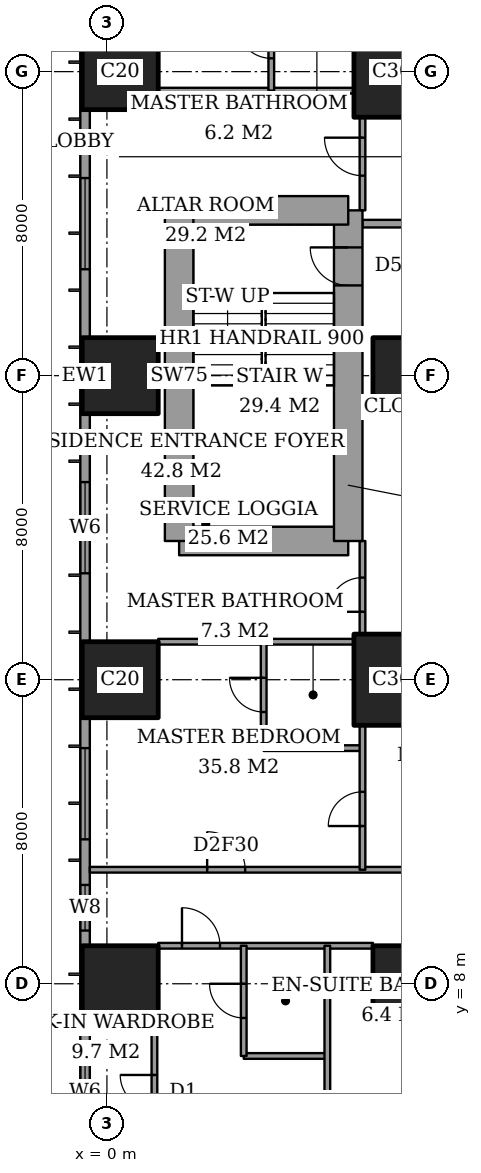
"""IFC4 building model, lengths in metres.
Left out: names, types, materials, properties, quantities, classifications, styles, units other than length and angle.
Written with IfcOpenShell. Run it as: python <this file> out.ifc"""

import sys

from ifc_helpers import new_model, si_unit, direction, frame, frame_2d, origin, origin_2d, place, context, subcontext, project, spatial, rectangle, extrude, element, fill, save


model = new_model("IFC4")
c1 = context("Model", 3, precision=1e-05, world=origin(), true_north=direction((0.0, 1.0)))
c2 = subcontext(c1, "Body", "Model", "MODEL_VIEW")
j1 = project(units=[si_unit("LENGTHUNIT", "METRE"), si_unit("PLANEANGLEUNIT", "RADIAN")], contexts=[c1])
p1 = place(None, origin())
s1 = spatial("IfcSite", under=j1, at=p1, CompositionType="ELEMENT")
p2 = place(p1, origin())
s2 = spatial("IfcBuilding", under=s1, at=p2, CompositionType="ELEMENT")
p3 = place(p2, frame((0.0, 0.0, 69.2)))
s3 = spatial("IfcBuildingStorey", under=s2, at=p3, CompositionType="ELEMENT", Elevation=69.2)
for number, where, z_axis, x_axis in (
    (1, (0.35, 8.0, 0.0), (0.0, 0.0, 1.0), (1.0, 0.0, 0.0)),
    (2, (0.35, 16.0, 0.0), (0.0, 0.0, 1.0), (1.0, 0.0, 0.0)),
    (3, (0.35, 24.0, 0.0), (0.0, 0.0, 1.0), (1.0, 0.0, 0.0)),
    (4, (0.35, 32.0, 0.0), (0.0, 0.0, 1.0), (1.0, 0.0, 0.0)),
    (5, (8.0, 8.0, 0.0), (0.0, 0.0, 1.0), (1.0, 0.0, 0.0)),
):
    element("IfcColumn", number, at=place(p3, frame(where, z_axis=z_axis, x_axis=x_axis)), inside=s3, PredefinedType="COLUMN", context=c2, shape_type="SweptSolid", body=[
        extrude(rectangle(XDim=2.0, YDim=2.0, at=origin_2d()), origin(), (0.0, 0.0, 1.0), 3.6),
    ])
p4 = place(p3, frame((8.0, 16.0, 0.0), z_axis=(0.0, 0.0, 1.0), x_axis=(1.0, 0.0, 0.0)))
e6 = element("IfcColumn", 6, at=p4, inside=s3, PredefinedType="COLUMN", context=c2, shape_type="SweptSolid", body=[
    extrude(rectangle(XDim=3.0, YDim=2.4, at=origin_2d()), origin(), (0.0, 0.0, 1.0), 3.6),
])
p5 = place(p3, frame((8.0, 24.0, 0.0), z_axis=(0.0, 0.0, 1.0), x_axis=(1.0, 0.0, 0.0)))
e7 = element("IfcColumn", 7, at=p5, inside=s3, PredefinedType="COLUMN", context=c2, shape_type="SweptSolid", body=[
    extrude(rectangle(XDim=2.0, YDim=2.0, at=origin_2d()), origin(), (0.0, 0.0, 1.0), 3.6),
])
p6 = place(p3, frame((8.0, 32.0, 0.0), z_axis=(0.0, 0.0, 1.0), x_axis=(1.0, 0.0, 0.0)))
e8 = element("IfcColumn", 8, at=p6, inside=s3, PredefinedType="COLUMN", context=c2, shape_type="SweptSolid", body=[
    extrude(rectangle(XDim=3.0, YDim=2.4, at=origin_2d()), origin(), (0.0, 0.0, 1.0), 3.6),
])
p7 = place(p3, frame((1.9, 19.65, 0.0), z_axis=(0.0, 0.0, 1.0), x_axis=(1.0, 0.0, 0.0)))
e9 = element("IfcWall", 9, at=p7, inside=s3, PredefinedType="SHEAR", context=c2, shape_type="SweptSolid", body=[
    extrude(rectangle(XDim=4.45, YDim=0.75, at=frame_2d((2.225, 0.0))), origin(), (0.0, 0.0, 1.0), 3.6),
])
p8 = place(p3, frame((6.35, 19.65, 0.0), z_axis=(0.0, 0.0, 1.0), x_axis=(0.0, 1.0, 0.0)))
e10 = element("IfcWall", 10, at=p8, inside=s3, PredefinedType="SHEAR", context=c2, shape_type="SweptSolid", body=[
    extrude(rectangle(XDim=8.7, YDim=0.75, at=frame_2d((4.35, 0.0))), origin(), (0.0, 0.0, 1.0), 3.6),
])
p9 = place(p8, frame((6.725, 0.0, 0.0)))
e11 = element("IfcOpeningElement", 11, at=p9, cuts=e10, PredefinedType="OPENING", context=c2, shape_type="SweptSolid", body=[
    extrude(rectangle(XDim=1.0, YDim=2.1, at=frame_2d((0.5, 1.05))), frame((0.0, 0.385, 0.0), z_axis=(0.0, -1.0, 0.0), x_axis=(1.0, 0.0, 0.0)), (0.0, 0.0, 1.0), 0.77),
])
p10 = place(p3, frame((6.35, 28.35, 0.0), z_axis=(0.0, 0.0, 1.0), x_axis=(-1.0, 0.0, 0.0)))
e12 = element("IfcWall", 12, at=p10, inside=s3, PredefinedType="SHEAR", context=c2, shape_type="SweptSolid", body=[
    extrude(rectangle(XDim=4.45, YDim=0.75, at=frame_2d((2.225, 0.0))), origin(), (0.0, 0.0, 1.0), 3.6),
])
p11 = place(p3, frame((1.9, 28.35, 0.0), z_axis=(0.0, 0.0, 1.0), x_axis=(0.0, -1.0, 0.0)))
e13 = element("IfcWall", 13, at=p11, inside=s3, PredefinedType="SHEAR", context=c2, shape_type="SweptSolid", body=[
    extrude(rectangle(XDim=8.7, YDim=0.75, at=frame_2d((4.35, 0.0))), origin(), (0.0, 0.0, 1.0), 3.6),
])
p12 = place(p3, frame((-0.575, 44.825, 0.0), z_axis=(0.0, 0.0, 1.0), x_axis=(0.0, -1.0, 0.0)))
e14 = element("IfcWall", 14, at=p12, inside=s3, PredefinedType="SOLIDWALL", context=c2, shape_type="SweptSolid", body=[
    extrude(rectangle(XDim=41.65, YDim=0.25, at=frame_2d((20.825, 0.0))), origin(), (0.0, 0.0, 1.0), 3.6),
])
p13 = place(p12, frame((0.775, 0.0, 0.6)))
e15 = element("IfcOpeningElement", 15, at=p13, cuts=e14, PredefinedType="OPENING", context=c2, shape_type="SweptSolid", body=[
    extrude(rectangle(XDim=2.4, YDim=2.0, at=frame_2d((1.2, 1.0))), frame((0.0, 0.135, 0.0), z_axis=(0.0, -1.0, 0.0), x_axis=(1.0, 0.0, 0.0)), (0.0, 0.0, 1.0), 0.27),
])
p14 = place(p12, frame((6.1, 0.0, 0.6)))
e16 = element("IfcOpeningElement", 16, at=p14, cuts=e14, PredefinedType="OPENING", context=c2, shape_type="SweptSolid", body=[
    extrude(rectangle(XDim=1.2, YDim=2.0, at=frame_2d((0.6, 1.0))), frame((0.0, 0.135, 0.0), z_axis=(0.0, -1.0, 0.0), x_axis=(1.0, 0.0, 0.0)), (0.0, 0.0, 1.0), 0.27),
])
p15 = place(p12, frame((8.425, 0.0, 0.6)))
e17 = element("IfcOpeningElement", 17, at=p15, cuts=e14, PredefinedType="OPENING", context=c2, shape_type="SweptSolid", body=[
    extrude(rectangle(XDim=2.4, YDim=2.0, at=frame_2d((1.2, 1.0))), frame((0.0, 0.135, 0.0), z_axis=(0.0, -1.0, 0.0), x_axis=(1.0, 0.0, 0.0)), (0.0, 0.0, 1.0), 0.27),
])
p16 = place(p12, frame((15.625, 0.0, 0.6)))
e18 = element("IfcOpeningElement", 18, at=p16, cuts=e14, PredefinedType="OPENING", context=c2, shape_type="SweptSolid", body=[
    extrude(rectangle(XDim=2.4, YDim=2.0, at=frame_2d((1.2, 1.0))), frame((0.0, 0.135, 0.0), z_axis=(0.0, -1.0, 0.0), x_axis=(1.0, 0.0, 0.0)), (0.0, 0.0, 1.0), 0.27),
])
p17 = place(p12, frame((23.625, 0.0, 0.6)))
e19 = element("IfcOpeningElement", 19, at=p17, cuts=e14, PredefinedType="OPENING", context=c2, shape_type="SweptSolid", body=[
    extrude(rectangle(XDim=2.4, YDim=2.0, at=frame_2d((1.2, 1.0))), frame((0.0, 0.135, 0.0), z_axis=(0.0, -1.0, 0.0), x_axis=(1.0, 0.0, 0.0)), (0.0, 0.0, 1.0), 0.27),
])
p18 = place(p12, frame((30.625, 0.0, 0.6)))
e20 = element("IfcOpeningElement", 20, at=p18, cuts=e14, PredefinedType="OPENING", context=c2, shape_type="SweptSolid", body=[
    extrude(rectangle(XDim=2.4, YDim=2.0, at=frame_2d((1.2, 1.0))), frame((0.0, 0.135, 0.0), z_axis=(0.0, -1.0, 0.0), x_axis=(1.0, 0.0, 0.0)), (0.0, 0.0, 1.0), 0.27),
])
p19 = place(p12, frame((34.225, 0.0, 0.6)))
e21 = element("IfcOpeningElement", 21, at=p19, cuts=e14, PredefinedType="OPENING", context=c2, shape_type="SweptSolid", body=[
    extrude(rectangle(XDim=1.2, YDim=2.0, at=frame_2d((0.6, 1.0))), frame((0.0, 0.135, 0.0), z_axis=(0.0, -1.0, 0.0), x_axis=(1.0, 0.0, 0.0)), (0.0, 0.0, 1.0), 0.27),
])
p20 = place(p12, frame((38.475, 0.0, 0.6)))
e22 = element("IfcOpeningElement", 22, at=p20, cuts=e14, PredefinedType="OPENING", context=c2, shape_type="SweptSolid", body=[
    extrude(rectangle(XDim=2.4, YDim=2.0, at=frame_2d((1.2, 1.0))), frame((0.0, 0.135, 0.0), z_axis=(0.0, -1.0, 0.0), x_axis=(1.0, 0.0, 0.0)), (0.0, 0.0, 1.0), 0.27),
])
p21 = place(p3, frame((3.6, 6.1, 0.0), z_axis=(0.0, 0.0, 1.0), x_axis=(1.0, 0.0, 0.0)))
e23 = element("IfcWall", 23, at=p21, inside=s3, PredefinedType="PARTITIONING", context=c2, shape_type="SweptSolid", body=[
    extrude(rectangle(XDim=2.2, YDim=0.15, at=frame_2d((1.1, 0.0))), origin(), (0.0, 0.0, 1.0), 3.35),
])
p22 = place(p3, frame((1.35, 9.0, 0.0), z_axis=(0.0, 0.0, 1.0), x_axis=(1.0, 0.0, 0.0)))
e24 = element("IfcWall", 24, at=p22, inside=s3, PredefinedType="PARTITIONING", context=c2, shape_type="SweptSolid", body=[
    extrude(rectangle(XDim=5.65, YDim=0.15, at=frame_2d((2.825, 0.0))), origin(), (0.0, 0.0, 1.0), 3.35),
])
p23 = place(p22, frame((0.625, 0.0, 0.0)))
e25 = element("IfcOpeningElement", 25, at=p23, cuts=e24, PredefinedType="OPENING", context=c2, shape_type="SweptSolid", body=[
    extrude(rectangle(XDim=1.0, YDim=2.1, at=frame_2d((0.5, 1.05))), frame((0.0, 0.085, 0.0), z_axis=(0.0, -1.0, 0.0), x_axis=(1.0, 0.0, 0.0)), (0.0, 0.0, 1.0), 0.17),
])
p24 = place(p3, frame((-0.45, 11.0, 0.0), z_axis=(0.0, 0.0, 1.0), x_axis=(1.0, 0.0, 0.0)))
e26 = element("IfcWall", 26, at=p24, inside=s3, PredefinedType="PARTITIONING", context=c2, shape_type="SweptSolid", body=[
    extrude(rectangle(XDim=25.011, YDim=0.15, at=frame_2d((12.505, 0.0))), origin(), (0.0, 0.0, 1.0), 3.35),
])
p25 = place(p24, frame((12.05, 0.0, 0.0)))
e27 = element("IfcOpeningElement", 27, at=p25, cuts=e26, PredefinedType="OPENING", context=c2, shape_type="SweptSolid", body=[
    extrude(rectangle(XDim=1.0, YDim=2.1, at=frame_2d((0.5, 1.05))), frame((0.0, 0.085, 0.0), z_axis=(0.0, -1.0, 0.0), x_axis=(1.0, 0.0, 0.0)), (0.0, 0.0, 1.0), 0.17),
])
p26 = place(p24, frame((3.087, 0.0, 0.0)))
e28 = element("IfcOpeningElement", 28, at=p26, cuts=e26, PredefinedType="OPENING", context=c2, shape_type="SweptSolid", body=[
    extrude(rectangle(XDim=1.0, YDim=2.1, at=frame_2d((0.5, 1.05))), frame((0.0, 0.085, 0.0), z_axis=(0.0, -1.0, 0.0), x_axis=(1.0, 0.0, 0.0)), (0.0, 0.0, 1.0), 0.17),
])
p27 = place(p24, frame((15.55, 0.0, 0.0)))
e29 = element("IfcOpeningElement", 29, at=p27, cuts=e26, PredefinedType="OPENING", context=c2, shape_type="SweptSolid", body=[
    extrude(rectangle(XDim=1.0, YDim=2.1, at=frame_2d((0.5, 1.05))), frame((0.0, 0.085, 0.0), z_axis=(0.0, -1.0, 0.0), x_axis=(1.0, 0.0, 0.0)), (0.0, 0.0, 1.0), 0.17),
])
p28 = place(p24, frame((21.175, 0.0, 0.0)))
e30 = element("IfcOpeningElement", 30, at=p28, cuts=e26, PredefinedType="OPENING", context=c2, shape_type="SweptSolid", body=[
    extrude(rectangle(XDim=1.0, YDim=2.1, at=frame_2d((0.5, 1.05))), frame((0.0, 0.085, 0.0), z_axis=(0.0, -1.0, 0.0), x_axis=(1.0, 0.0, 0.0)), (0.0, 0.0, 1.0), 0.17),
])
p29 = place(p3, frame((4.125, 14.2, 0.0), z_axis=(0.0, 0.0, 1.0), x_axis=(1.0, 0.0, 0.0)))
e31 = element("IfcWall", 31, at=p29, inside=s3, PredefinedType="PARTITIONING", context=c2, shape_type="SweptSolid", body=[
    extrude(rectangle(XDim=2.6, YDim=0.15, at=frame_2d((1.3, 0.0))), origin(), (0.0, 0.0, 1.0), 3.35),
])
p30 = place(p3, frame((1.35, 17.0, 0.0), z_axis=(0.0, 0.0, 1.0), x_axis=(1.0, 0.0, 0.0)))
e32 = element("IfcWall", 32, at=p30, inside=s3, PredefinedType="PARTITIONING", context=c2, shape_type="SweptSolid", body=[
    extrude(rectangle(XDim=5.15, YDim=0.15, at=frame_2d((2.575, 0.0))), origin(), (0.0, 0.0, 1.0), 3.35),
])
p31 = place(p3, frame((6.725, 28.0, 0.0), z_axis=(0.0, 0.0, 1.0), x_axis=(1.0, 0.0, 0.0)))
e33 = element("IfcWall", 33, at=p31, inside=s3, PredefinedType="PARTITIONING", context=c2, shape_type="SweptSolid", body=[
    extrude(rectangle(XDim=17.275, YDim=0.2, at=frame_2d((8.637, 0.0))), origin(), (0.0, 0.0, 1.0), 3.35),
])
p32 = place(p31, frame((6.475, 0.0, 0.0)))
e34 = element("IfcOpeningElement", 34, at=p32, cuts=e33, PredefinedType="OPENING", context=c2, shape_type="SweptSolid", body=[
    extrude(rectangle(XDim=1.2, YDim=2.4, at=frame_2d((0.6, 1.2))), frame((0.0, 0.11, 0.0), z_axis=(0.0, -1.0, 0.0), x_axis=(1.0, 0.0, 0.0)), (0.0, 0.0, 1.0), 0.22),
])
p33 = place(p3, frame((1.35, 31.5, 0.0), z_axis=(0.0, 0.0, 1.0), x_axis=(1.0, 0.0, 0.0)))
e35 = element("IfcWall", 35, at=p33, inside=s3, PredefinedType="PARTITIONING", context=c2, shape_type="SweptSolid", body=[
    extrude(rectangle(XDim=5.15, YDim=0.15, at=frame_2d((2.575, 0.0))), origin(), (0.0, 0.0, 1.0), 3.35),
])
p34 = place(p3, frame((1.25, 3.3, 0.0), z_axis=(0.0, 0.0, 1.0), x_axis=(0.0, 1.0, 0.0)))
e36 = element("IfcWall", 36, at=p34, inside=s3, PredefinedType="PARTITIONING", context=c2, shape_type="SweptSolid", body=[
    extrude(rectangle(XDim=3.7, YDim=0.15, at=frame_2d((1.85, 0.0))), origin(), (0.0, 0.0, 1.0), 3.35),
])
p35 = place(p34, frame((1.4, 0.0, 0.0)))
e37 = element("IfcOpeningElement", 37, at=p35, cuts=e36, PredefinedType="OPENING", context=c2, shape_type="SweptSolid", body=[
    extrude(rectangle(XDim=0.9, YDim=2.1, at=frame_2d((0.45, 1.05))), frame((0.0, 0.085, 0.0), z_axis=(0.0, -1.0, 0.0), x_axis=(1.0, 0.0, 0.0)), (0.0, 0.0, 1.0), 0.17),
])
p36 = place(p3, frame((3.6, 6.1, 0.0), z_axis=(0.0, 0.0, 1.0), x_axis=(0.0, 1.0, 0.0)))
e38 = element("IfcWall", 38, at=p36, inside=s3, PredefinedType="PARTITIONING", context=c2, shape_type="SweptSolid", body=[
    extrude(rectangle(XDim=2.9, YDim=0.15, at=frame_2d((1.45, 0.0))), origin(), (0.0, 0.0, 1.0), 3.35),
])
p37 = place(p36, frame((1.0, 0.0, 0.0)))
e39 = element("IfcOpeningElement", 39, at=p37, cuts=e38, PredefinedType="OPENING", context=c2, shape_type="SweptSolid", body=[
    extrude(rectangle(XDim=0.9, YDim=2.1, at=frame_2d((0.45, 1.05))), frame((0.0, 0.085, 0.0), z_axis=(0.0, -1.0, 0.0), x_axis=(1.0, 0.0, 0.0)), (0.0, 0.0, 1.0), 0.17),
])
p38 = place(p3, frame((4.125, 14.2, 0.0), z_axis=(0.0, 0.0, 1.0), x_axis=(0.0, 1.0, 0.0)))
e40 = element("IfcWall", 40, at=p38, inside=s3, PredefinedType="PARTITIONING", context=c2, shape_type="SweptSolid", body=[
    extrude(rectangle(XDim=2.8, YDim=0.15, at=frame_2d((1.4, 0.0))), origin(), (0.0, 0.0, 1.0), 3.35),
])
p39 = place(p38, frame((0.95, 0.0, 0.0)))
e41 = element("IfcOpeningElement", 41, at=p39, cuts=e40, PredefinedType="OPENING", context=c2, shape_type="SweptSolid", body=[
    extrude(rectangle(XDim=0.9, YDim=2.1, at=frame_2d((0.45, 1.05))), frame((0.0, 0.085, 0.0), z_axis=(0.0, -1.0, 0.0), x_axis=(1.0, 0.0, 0.0)), (0.0, 0.0, 1.0), 0.17),
])
p40 = place(p3, frame((4.325, 31.5, 0.0), z_axis=(0.0, 0.0, 1.0), x_axis=(0.0, 1.0, 0.0)))
e42 = element("IfcWall", 42, at=p40, inside=s3, PredefinedType="PARTITIONING", context=c2, shape_type="SweptSolid", body=[
    extrude(rectangle(XDim=2.6, YDim=0.15, at=frame_2d((1.3, 0.0))), origin(), (0.0, 0.0, 1.0), 3.35),
])
p41 = place(p40, frame((0.85, 0.0, 0.0)))
e43 = element("IfcOpeningElement", 43, at=p41, cuts=e42, PredefinedType="OPENING", context=c2, shape_type="SweptSolid", body=[
    extrude(rectangle(XDim=0.9, YDim=2.1, at=frame_2d((0.45, 1.05))), frame((0.0, 0.085, 0.0), z_axis=(0.0, -1.0, 0.0), x_axis=(1.0, 0.0, 0.0)), (0.0, 0.0, 1.0), 0.17),
])
p42 = place(p3, frame((5.8, -0.45, 0.0), z_axis=(0.0, 0.0, 1.0), x_axis=(0.0, 1.0, 0.0)))
e44 = element("IfcWall", 44, at=p42, inside=s3, PredefinedType="PARTITIONING", context=c2, shape_type="SweptSolid", body=[
    extrude(rectangle(XDim=9.45, YDim=0.15, at=frame_2d((4.725, 0.0))), origin(), (0.0, 0.0, 1.0), 3.35),
])
p43 = place(p3, frame((6.725, 11.0, 0.0), z_axis=(0.0, 0.0, 1.0), x_axis=(0.0, 1.0, 0.0)))
e45 = element("IfcWall", 45, at=p43, inside=s3, PredefinedType="PARTITIONING", context=c2, shape_type="SweptSolid", body=[
    extrude(rectangle(XDim=3.8, YDim=0.15, at=frame_2d((1.9, 0.0))), origin(), (0.0, 0.0, 1.0), 3.35),
])
p44 = place(p43, frame((1.15, 0.0, 0.0)))
e46 = element("IfcOpeningElement", 46, at=p44, cuts=e45, PredefinedType="OPENING", context=c2, shape_type="SweptSolid", body=[
    extrude(rectangle(XDim=0.9, YDim=2.1, at=frame_2d((0.45, 1.05))), frame((0.0, 0.085, 0.0), z_axis=(0.0, -1.0, 0.0), x_axis=(1.0, 0.0, 0.0)), (0.0, 0.0, 1.0), 0.17),
])
p45 = place(p3, frame((6.725, 17.2, 0.0), z_axis=(0.0, 0.0, 1.0), x_axis=(0.0, 1.0, 0.0)))
e47 = element("IfcWall", 47, at=p45, inside=s3, PredefinedType="PARTITIONING", context=c2, shape_type="SweptSolid", body=[
    extrude(rectangle(XDim=2.45, YDim=0.15, at=frame_2d((1.225, 0.0))), origin(), (0.0, 0.0, 1.0), 3.35),
])
p46 = place(p45, frame((0.587, 0.0, 0.0)))
e48 = element("IfcOpeningElement", 48, at=p46, cuts=e47, PredefinedType="OPENING", context=c2, shape_type="SweptSolid", body=[
    extrude(rectangle(XDim=0.9, YDim=2.1, at=frame_2d((0.45, 1.05))), frame((0.0, 0.085, 0.0), z_axis=(0.0, -1.0, 0.0), x_axis=(1.0, 0.0, 0.0)), (0.0, 0.0, 1.0), 0.17),
])
p47 = place(p3, frame((6.725, 28.35, 0.0), z_axis=(0.0, 0.0, 1.0), x_axis=(0.0, 1.0, 0.0)))
e49 = element("IfcWall", 49, at=p47, inside=s3, PredefinedType="PARTITIONING", context=c2, shape_type="SweptSolid", body=[
    extrude(rectangle(XDim=2.45, YDim=0.15, at=frame_2d((1.225, 0.0))), origin(), (0.0, 0.0, 1.0), 3.35),
])
p48 = place(p47, frame((0.913, 0.0, 0.0)))
e50 = element("IfcOpeningElement", 50, at=p48, cuts=e49, PredefinedType="OPENING", context=c2, shape_type="SweptSolid", body=[
    extrude(rectangle(XDim=1.0, YDim=2.1, at=frame_2d((0.5, 1.05))), frame((0.0, 0.085, 0.0), z_axis=(0.0, -1.0, 0.0), x_axis=(1.0, 0.0, 0.0)), (0.0, 0.0, 1.0), 0.17),
])
p49 = place(p16, origin())
e51 = element("IfcWindow", 51, at=p49, inside=s3, PartitioningType="SINGLE_PANEL", PredefinedType="WINDOW", context=c2, shape_type="SweptSolid", body=[
    extrude(rectangle(XDim=2.4, YDim=2.0, at=frame_2d((1.2, 1.0))), frame((0.0, 0.03, 0.0), z_axis=(0.0, -1.0, 0.0), x_axis=(1.0, 0.0, 0.0)), (0.0, 0.0, 1.0), 0.06),
])
fill(e18, e51)
p50 = place(p17, origin())
e52 = element("IfcWindow", 52, at=p50, inside=s3, PartitioningType="SINGLE_PANEL", PredefinedType="WINDOW", context=c2, shape_type="SweptSolid", body=[
    extrude(rectangle(XDim=2.4, YDim=2.0, at=frame_2d((1.2, 1.0))), frame((0.0, 0.03, 0.0), z_axis=(0.0, -1.0, 0.0), x_axis=(1.0, 0.0, 0.0)), (0.0, 0.0, 1.0), 0.06),
])
fill(e19, e52)
p51 = place(p18, origin())
e53 = element("IfcWindow", 53, at=p51, inside=s3, PartitioningType="SINGLE_PANEL", PredefinedType="WINDOW", context=c2, shape_type="SweptSolid", body=[
    extrude(rectangle(XDim=2.4, YDim=2.0, at=frame_2d((1.2, 1.0))), frame((0.0, 0.03, 0.0), z_axis=(0.0, -1.0, 0.0), x_axis=(1.0, 0.0, 0.0)), (0.0, 0.0, 1.0), 0.06),
])
fill(e20, e53)
p52 = place(p19, origin())
e54 = element("IfcWindow", 54, at=p52, inside=s3, PartitioningType="SINGLE_PANEL", PredefinedType="WINDOW", context=c2, shape_type="SweptSolid", body=[
    extrude(rectangle(XDim=1.2, YDim=2.0, at=frame_2d((0.6, 1.0))), frame((0.0, 0.03, 0.0), z_axis=(0.0, -1.0, 0.0), x_axis=(1.0, 0.0, 0.0)), (0.0, 0.0, 1.0), 0.06),
])
fill(e21, e54)
p53 = place(p20, origin())
e55 = element("IfcWindow", 55, at=p53, inside=s3, PartitioningType="SINGLE_PANEL", PredefinedType="WINDOW", context=c2, shape_type="SweptSolid", body=[
    extrude(rectangle(XDim=2.4, YDim=2.0, at=frame_2d((1.2, 1.0))), frame((0.0, 0.03, 0.0), z_axis=(0.0, -1.0, 0.0), x_axis=(1.0, 0.0, 0.0)), (0.0, 0.0, 1.0), 0.06),
])
fill(e22, e55)
p54 = place(p35, origin())
e56 = element("IfcDoor", 56, at=p54, inside=s3, OperationType="SINGLE_SWING_LEFT", PredefinedType="DOOR", context=c2, shape_type="SweptSolid", body=[
    extrude(rectangle(XDim=0.9, YDim=2.1, at=frame_2d((0.45, 1.05))), frame((0.0, 0.025, 0.0), z_axis=(0.0, -1.0, 0.0), x_axis=(1.0, 0.0, 0.0)), (0.0, 0.0, 1.0), 0.05),
])
fill(e37, e56)
p55 = place(p37, origin())
e57 = element("IfcDoor", 57, at=p55, inside=s3, OperationType="SINGLE_SWING_LEFT", PredefinedType="DOOR", context=c2, shape_type="SweptSolid", body=[
    extrude(rectangle(XDim=0.9, YDim=2.1, at=frame_2d((0.45, 1.05))), frame((0.0, 0.025, 0.0), z_axis=(0.0, -1.0, 0.0), x_axis=(1.0, 0.0, 0.0)), (0.0, 0.0, 1.0), 0.05),
])
fill(e39, e57)
p56 = place(p23, origin())
e58 = element("IfcDoor", 58, at=p56, inside=s3, OperationType="SINGLE_SWING_RIGHT", PredefinedType="DOOR", context=c2, shape_type="SweptSolid", body=[
    extrude(rectangle(XDim=1.0, YDim=2.1, at=frame_2d((0.5, 1.05))), frame((0.0, 0.025, 0.0), z_axis=(0.0, -1.0, 0.0), x_axis=(1.0, 0.0, 0.0)), (0.0, 0.0, 1.0), 0.05),
])
fill(e25, e58)
p57 = place(p39, origin())
e59 = element("IfcDoor", 59, at=p57, inside=s3, OperationType="SINGLE_SWING_LEFT", PredefinedType="DOOR", context=c2, shape_type="SweptSolid", body=[
    extrude(rectangle(XDim=0.9, YDim=2.1, at=frame_2d((0.45, 1.05))), frame((0.0, 0.025, 0.0), z_axis=(0.0, -1.0, 0.0), x_axis=(1.0, 0.0, 0.0)), (0.0, 0.0, 1.0), 0.05),
])
fill(e41, e59)
p58 = place(p26, origin())
e60 = element("IfcDoor", 60, at=p58, inside=s3, OperationType="SINGLE_SWING_RIGHT", PredefinedType="DOOR", context=c2, shape_type="SweptSolid", body=[
    extrude(rectangle(XDim=1.0, YDim=2.1, at=frame_2d((0.5, 1.05))), frame((0.0, 0.025, 0.0), z_axis=(0.0, -1.0, 0.0), x_axis=(1.0, 0.0, 0.0)), (0.0, 0.0, 1.0), 0.05),
])
fill(e28, e60)
p59 = place(p46, origin())
e61 = element("IfcDoor", 61, at=p59, inside=s3, OperationType="SINGLE_SWING_RIGHT", PredefinedType="DOOR", context=c2, shape_type="SweptSolid", body=[
    extrude(rectangle(XDim=0.9, YDim=2.1, at=frame_2d((0.45, 1.05))), frame((0.0, 0.025, 0.0), z_axis=(0.0, -1.0, 0.0), x_axis=(1.0, 0.0, 0.0)), (0.0, 0.0, 1.0), 0.05),
])
fill(e48, e61)
p60 = place(p44, origin())
e62 = element("IfcDoor", 62, at=p60, inside=s3, OperationType="SINGLE_SWING_RIGHT", PredefinedType="DOOR", context=c2, shape_type="SweptSolid", body=[
    extrude(rectangle(XDim=0.9, YDim=2.1, at=frame_2d((0.45, 1.05))), frame((0.0, 0.025, 0.0), z_axis=(0.0, -1.0, 0.0), x_axis=(1.0, 0.0, 0.0)), (0.0, 0.0, 1.0), 0.05),
])
fill(e46, e62)
p61 = place(p41, origin())
e63 = element("IfcDoor", 63, at=p61, inside=s3, OperationType="SINGLE_SWING_LEFT", PredefinedType="DOOR", context=c2, shape_type="SweptSolid", body=[
    extrude(rectangle(XDim=0.9, YDim=2.1, at=frame_2d((0.45, 1.05))), frame((0.0, 0.025, 0.0), z_axis=(0.0, -1.0, 0.0), x_axis=(1.0, 0.0, 0.0)), (0.0, 0.0, 1.0), 0.05),
])
fill(e43, e63)
p62 = place(p48, origin())
e64 = element("IfcDoor", 64, at=p62, inside=s3, OperationType="SINGLE_SWING_LEFT", PredefinedType="DOOR", context=c2, shape_type="SweptSolid", body=[
    extrude(rectangle(XDim=1.0, YDim=2.1, at=frame_2d((0.5, 1.05))), frame((0.0, 0.025, 0.0), z_axis=(0.0, -1.0, 0.0), x_axis=(1.0, 0.0, 0.0)), (0.0, 0.0, 1.0), 0.05),
])
fill(e50, e64)
p63 = place(p9, origin())
e65 = element("IfcDoor", 65, at=p63, inside=s3, OperationType="SINGLE_SWING_LEFT", PredefinedType="DOOR", context=c2, shape_type="SweptSolid", body=[
    extrude(rectangle(XDim=1.0, YDim=2.1, at=frame_2d((0.5, 1.05))), frame((0.0, 0.025, 0.0), z_axis=(0.0, -1.0, 0.0), x_axis=(1.0, 0.0, 0.0)), (0.0, 0.0, 1.0), 0.05),
])
fill(e11, e65)
save(model, sys.argv[1])
